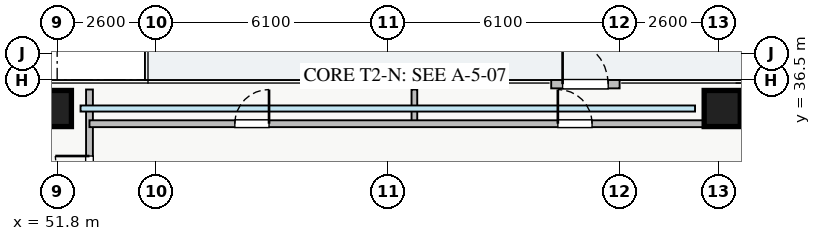
"""IFC4 building model, lengths in metres.
Left out: names, types, materials, properties, quantities, classifications, styles, units other than length and angle.
Written with IfcOpenShell. Run it as: python <this file> out.ifc"""

import sys

from ifc_helpers import new_model, si_unit, direction, frame, frame_2d, origin, origin_2d, place, context, subcontext, project, spatial, rectangle, extrude, source, transform, mapped, element, fill, save


model = new_model("IFC4")
c1 = context("Model", 3, precision=1e-05, world=origin(), true_north=direction((0.0, 1.0)))
c2 = subcontext(c1, "Body", "Model", "MODEL_VIEW")
j1 = project(units=[si_unit("LENGTHUNIT", "METRE"), si_unit("PLANEANGLEUNIT", "RADIAN")], contexts=[c1])
p1 = place(None, origin())
s1 = spatial("IfcSite", under=j1, at=p1, CompositionType="ELEMENT")
p2 = place(p1, origin())
s2 = spatial("IfcBuilding", under=s1, at=p2, CompositionType="ELEMENT")
p3 = place(p2, frame((0.0, 0.0, 23.0)))
s3 = spatial("IfcBuildingStorey", under=s2, at=p3, CompositionType="ELEMENT", Elevation=23.0)
m1 = source(origin(), c2, "Body", "SweptSolid", [
    extrude(rectangle(XDim=0.95, YDim=0.95, at=origin_2d()), origin(), (0.0, 0.0, 1.0), 3.25),
])
for number, where, z_axis, x_axis in (
    (1, (69.3, 35.75, 0.0), (0.0, 0.0, 1.0), (1.0, 0.0, 0.0)),
    (2, (51.7, 35.75, 0.0), (0.0, 0.0, 1.0), (1.0, 0.0, 0.0)),
):
    element("IfcColumn", number, at=place(p3, frame(where, z_axis=z_axis, x_axis=x_axis)), inside=s3, PredefinedType="COLUMN", context=c2, shape_type="MappedRepresentation", body=[
        mapped(m1, transform((0.0, 0.0, 0.0), x_axis=(1.0, 0.0, 0.0), y_axis=(0.0, 1.0, 0.0), z_axis=(0.0, 0.0, 1.0), scale=1.0)),
    ])
p4 = place(p3, frame((52.65, 9.75, 0.0), z_axis=(0.0, 0.0, 1.0), x_axis=(0.0, 1.0, 0.0)))
e3 = element("IfcWall", 3, at=p4, inside=s3, PredefinedType="PARTITIONING", context=c2, shape_type="SweptSolid", body=[
    extrude(rectangle(XDim=26.5, YDim=0.18, at=frame_2d((13.25, 0.0))), origin(), (0.0, 0.0, 1.0), 3.07),
])
p5 = place(p4, frame((23.85, 0.0, 0.0)))
e4 = element("IfcOpeningElement", 4, at=p5, cuts=e3, PredefinedType="OPENING", context=c2, shape_type="SweptSolid", body=[
    extrude(rectangle(XDim=0.9, YDim=2.05, at=frame_2d((0.45, 1.025))), frame((0.0, 0.1, 0.0), z_axis=(0.0, -1.0, 0.0), x_axis=(1.0, 0.0, 0.0)), (0.0, 0.0, 1.0), 0.2),
])
p6 = place(p4, frame((1.75, 0.0, 0.0)))
e5 = element("IfcOpeningElement", 5, at=p6, cuts=e3, PredefinedType="OPENING", context=c2, shape_type="SweptSolid", body=[
    extrude(rectangle(XDim=0.9, YDim=2.05, at=frame_2d((0.45, 1.025))), frame((0.0, 0.1, 0.0), z_axis=(0.0, -1.0, 0.0), x_axis=(1.0, 0.0, 0.0)), (0.0, 0.0, 1.0), 0.2),
])
p7 = place(p4, frame((5.145, 0.0, 0.0)))
e6 = element("IfcOpeningElement", 6, at=p7, cuts=e3, PredefinedType="OPENING", context=c2, shape_type="SweptSolid", body=[
    extrude(rectangle(XDim=1.0, YDim=2.05, at=frame_2d((0.5, 1.025))), frame((0.0, 0.1, 0.0), z_axis=(0.0, -1.0, 0.0), x_axis=(1.0, 0.0, 0.0)), (0.0, 0.0, 1.0), 0.2),
])
p8 = place(p4, frame((14.39, 0.0, 0.0)))
e7 = element("IfcOpeningElement", 7, at=p8, cuts=e3, PredefinedType="OPENING", context=c2, shape_type="SweptSolid", body=[
    extrude(rectangle(XDim=1.0, YDim=2.05, at=frame_2d((0.5, 1.025))), frame((0.0, 0.1, 0.0), z_axis=(0.0, -1.0, 0.0), x_axis=(1.0, 0.0, 0.0)), (0.0, 0.0, 1.0), 0.2),
])
for number, where, z_axis, x_axis in (
    (8, (61.2, 35.35, 0.0), (0.0, 0.0, 1.0), (0.0, 1.0, 0.0)),
    (9, (69.65, 35.35, 0.0), (0.0, 0.0, 1.0), (0.0, 1.0, 0.0)),
):
    element("IfcWall", number, at=place(p3, frame(where, z_axis=z_axis, x_axis=x_axis)), inside=s3, PredefinedType="PARTITIONING", context=c2, shape_type="SweptSolid", body=[
        extrude(rectangle(XDim=0.9, YDim=0.15, at=frame_2d((0.45, 0.0))), origin(), (0.0, 0.0, 1.0), 3.07),
    ])
p9 = place(p3, frame((52.65, 35.35, 0.0), z_axis=(0.0, 0.0, 1.0), x_axis=(1.0, 0.0, 0.0)))
e10 = element("IfcWall", 10, at=p9, inside=s3, PredefinedType="PARTITIONING", context=c2, shape_type="SweptSolid", body=[
    extrude(rectangle(XDim=17.0, YDim=0.18, at=frame_2d((8.5, 0.0))), origin(), (0.0, 0.0, 1.0), 3.07),
])
p10 = place(p9, frame((3.825, 0.0, 0.0)))
e11 = element("IfcOpeningElement", 11, at=p10, cuts=e10, PredefinedType="OPENING", context=c2, shape_type="SweptSolid", body=[
    extrude(rectangle(XDim=0.9, YDim=2.05, at=frame_2d((0.45, 1.025))), frame((0.0, 0.1, 0.0), z_axis=(0.0, -1.0, 0.0), x_axis=(1.0, 0.0, 0.0)), (0.0, 0.0, 1.0), 0.2),
])
p11 = place(p9, frame((12.325, 0.0, 0.0)))
e12 = element("IfcOpeningElement", 12, at=p11, cuts=e10, PredefinedType="OPENING", context=c2, shape_type="SweptSolid", body=[
    extrude(rectangle(XDim=0.9, YDim=2.05, at=frame_2d((0.45, 1.025))), frame((0.0, 0.1, 0.0), z_axis=(0.0, -1.0, 0.0), x_axis=(1.0, 0.0, 0.0)), (0.0, 0.0, 1.0), 0.2),
])
p12 = place(p3, frame((64.8, 36.39, 0.0), z_axis=(0.0, 0.0, 1.0), x_axis=(1.0, 0.0, 0.0)))
e13 = element("IfcWall", 13, at=p12, inside=s3, PredefinedType="STANDARD", context=c2, shape_type="SweptSolid", body=[
    extrude(rectangle(XDim=1.8, YDim=0.22, at=frame_2d((0.9, 0.0))), origin(), (0.0, 0.0, 1.0), 2.61),
])
p13 = place(p12, frame((0.3, 0.0, 0.0)))
e14 = element("IfcOpeningElement", 14, at=p13, cuts=e13, PredefinedType="OPENING", context=c2, shape_type="SweptSolid", body=[
    extrude(rectangle(XDim=1.2, YDim=2.1, at=frame_2d((0.6, 1.05))), frame((0.0, 0.12, 0.0), z_axis=(0.0, -1.0, 0.0), x_axis=(1.0, 0.0, 0.0)), (0.0, 0.0, 1.0), 0.24),
])
m2 = source(origin(), c2, "Body", "SweptSolid", [
    extrude(rectangle(XDim=0.9, YDim=2.05, at=frame_2d((0.45, 1.025))), frame((0.0, 0.025, 0.0), z_axis=(0.0, -1.0, 0.0), x_axis=(1.0, 0.0, 0.0)), (0.0, 0.0, 1.0), 0.05),
])
p14 = place(p5, origin())
e15 = element("IfcDoor", 15, at=p14, inside=s3, OperationType="SINGLE_SWING_RIGHT", PredefinedType="DOOR", context=c2, shape_type="MappedRepresentation", body=[
    mapped(m2, transform((0.0, 0.0, 0.0), x_axis=(1.0, 0.0, 0.0), y_axis=(0.0, 1.0, 0.0), z_axis=(0.0, 0.0, 1.0), scale=1.0)),
])
fill(e4, e15)
p15 = place(p10, origin())
e16 = element("IfcDoor", 16, at=p15, inside=s3, OperationType="SINGLE_SWING_RIGHT", PredefinedType="DOOR", context=c2, shape_type="MappedRepresentation", body=[
    mapped(m2, transform((0.0, 0.0, 0.0), x_axis=(1.0, 0.0, 0.0), y_axis=(0.0, 1.0, 0.0), z_axis=(0.0, 0.0, 1.0), scale=1.0)),
])
fill(e11, e16)
p16 = place(p11, origin())
e17 = element("IfcDoor", 17, at=p16, inside=s3, OperationType="SINGLE_SWING_LEFT", PredefinedType="DOOR", context=c2, shape_type="MappedRepresentation", body=[
    mapped(m2, transform((0.0, 0.0, 0.0), x_axis=(1.0, 0.0, 0.0), y_axis=(0.0, 1.0, 0.0), z_axis=(0.0, 0.0, 1.0), scale=1.0)),
])
fill(e12, e17)
m3 = source(origin(), c2, "Body", "SweptSolid", [
    extrude(rectangle(XDim=1.2, YDim=2.1, at=frame_2d((0.6, 1.05))), frame((0.0, 0.025, 0.0), z_axis=(0.0, -1.0, 0.0), x_axis=(1.0, 0.0, 0.0)), (0.0, 0.0, 1.0), 0.05),
])
p17 = place(p13, origin())
e18 = element("IfcDoor", 18, at=p17, inside=s3, OperationType="SINGLE_SWING_LEFT", PredefinedType="DOOR", context=c2, shape_type="MappedRepresentation", body=[
    mapped(m3, transform((0.0, 0.0, 0.0), x_axis=(1.0, 0.0, 0.0), y_axis=(0.0, 1.0, 0.0), z_axis=(0.0, 0.0, 1.0), scale=1.0)),
])
fill(e14, e18)
save(model, sys.argv[1])
